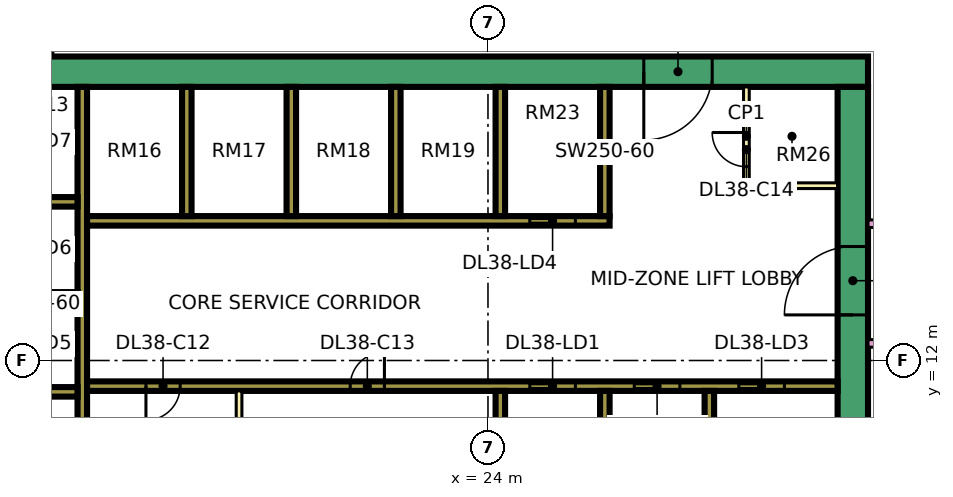
"""IFC4 building model, lengths in metres.
Left out: names, types, materials, properties, quantities, classifications, styles, units other than length and angle.
Written with IfcOpenShell. Run it as: python <this file> out.ifc"""

import sys

from ifc_helpers import new_model, si_unit, direction, frame, frame_2d, origin, place, context, subcontext, project, spatial, rectangle, extrude, element, fill, save


model = new_model("IFC4")
c1 = context("Model", 3, precision=1e-05, world=origin(), true_north=direction((0.0, 1.0)))
c2 = subcontext(c1, "Body", "Model", "MODEL_VIEW")
j1 = project(units=[si_unit("LENGTHUNIT", "METRE"), si_unit("PLANEANGLEUNIT", "RADIAN")], contexts=[c1])
p1 = place(None, origin())
s1 = spatial("IfcSite", under=j1, at=p1, CompositionType="ELEMENT")
p2 = place(p1, origin())
s2 = spatial("IfcBuilding", under=s1, at=p2, CompositionType="ELEMENT")
p3 = place(p2, frame((0.0, 0.0, 168.65)))
s3 = spatial("IfcBuildingStorey", under=s2, at=p3, CompositionType="ELEMENT", Elevation=168.65)
p4 = place(p3, frame((9.0, 19.6, 0.0), z_axis=(0.0, 0.0, 1.0), x_axis=(1.0, 0.0, 0.0)))
e1 = element("IfcWall", 1, at=p4, inside=s3, PredefinedType="SHEAR", context=c2, shape_type="SweptSolid", body=[
    extrude(rectangle(XDim=25.0, YDim=0.8, at=frame_2d((12.5, 0.0))), origin(), (0.0, 0.0, 1.0), 3.75),
])
p5 = place(p4, frame((19.1, 0.0, 0.0)))
e2 = element("IfcOpeningElement", 2, at=p5, cuts=e1, PredefinedType="OPENING", context=c2, shape_type="SweptSolid", body=[
    extrude(rectangle(XDim=1.8, YDim=2.4, at=frame_2d((0.9, 1.2))), frame((0.0, 0.41, 0.0), z_axis=(0.0, -1.0, 0.0), x_axis=(1.0, 0.0, 0.0)), (0.0, 0.0, 1.0), 0.82),
])
p6 = place(p3, frame((33.6, 7.8, 0.0), z_axis=(0.0, 0.0, 1.0), x_axis=(0.0, 1.0, 0.0)))
e3 = element("IfcWall", 3, at=p6, inside=s3, PredefinedType="SHEAR", context=c2, shape_type="SweptSolid", body=[
    extrude(rectangle(XDim=11.4, YDim=0.8, at=frame_2d((5.7, 0.0))), origin(), (0.0, 0.0, 1.0), 3.75),
])
p7 = place(p6, frame((5.4, 0.0, 0.0)))
e4 = element("IfcOpeningElement", 4, at=p7, cuts=e3, PredefinedType="OPENING", context=c2, shape_type="SweptSolid", body=[
    extrude(rectangle(XDim=1.8, YDim=2.4, at=frame_2d((0.9, 1.2))), frame((0.0, 0.41, 0.0), z_axis=(0.0, -1.0, 0.0), x_axis=(1.0, 0.0, 0.0)), (0.0, 0.0, 1.0), 0.82),
])
p8 = place(p3, frame((13.325, 7.8, 0.0), z_axis=(0.0, 0.0, 1.0), x_axis=(0.0, 1.0, 0.0)))
e5 = element("IfcWall", 5, at=p8, inside=s3, PredefinedType="SHEAR", context=c2, shape_type="SweptSolid", body=[
    extrude(rectangle(XDim=11.4, YDim=0.25, at=frame_2d((5.7, 0.0))), origin(), (0.0, 0.0, 1.0), 3.75),
])
p9 = place(p3, frame((13.45, 11.325, 0.0), z_axis=(0.0, 0.0, 1.0), x_axis=(1.0, 0.0, 0.0)))
e6 = element("IfcWall", 6, at=p9, inside=s3, PredefinedType="SHEAR", context=c2, shape_type="SweptSolid", body=[
    extrude(rectangle(XDim=19.75, YDim=0.25, at=frame_2d((9.875, 0.0))), origin(), (0.0, 0.0, 1.0), 3.75),
])
p10 = place(p9, frame((11.65, 0.0, 0.0)))
e7 = element("IfcOpeningElement", 7, at=p10, cuts=e6, PredefinedType="OPENING", context=c2, shape_type="SweptSolid", body=[
    extrude(rectangle(XDim=1.2, YDim=2.2, at=frame_2d((0.6, 1.1))), frame((0.0, 0.135, 0.0), z_axis=(0.0, -1.0, 0.0), x_axis=(1.0, 0.0, 0.0)), (0.0, 0.0, 1.0), 0.27),
])
p11 = place(p9, frame((14.4, 0.0, 0.0)))
e8 = element("IfcOpeningElement", 8, at=p11, cuts=e6, PredefinedType="OPENING", context=c2, shape_type="SweptSolid", body=[
    extrude(rectangle(XDim=1.2, YDim=2.2, at=frame_2d((0.6, 1.1))), frame((0.0, 0.135, 0.0), z_axis=(0.0, -1.0, 0.0), x_axis=(1.0, 0.0, 0.0)), (0.0, 0.0, 1.0), 0.27),
])
p12 = place(p9, frame((17.15, 0.0, 0.0)))
e9 = element("IfcOpeningElement", 9, at=p12, cuts=e6, PredefinedType="OPENING", context=c2, shape_type="SweptSolid", body=[
    extrude(rectangle(XDim=1.2, YDim=2.2, at=frame_2d((0.6, 1.1))), frame((0.0, 0.135, 0.0), z_axis=(0.0, -1.0, 0.0), x_axis=(1.0, 0.0, 0.0)), (0.0, 0.0, 1.0), 0.27),
])
p13 = place(p9, frame((1.55, 0.0, 0.0)))
e10 = element("IfcOpeningElement", 10, at=p13, cuts=e6, PredefinedType="OPENING", context=c2, shape_type="SweptSolid", body=[
    extrude(rectangle(XDim=0.9, YDim=2.1, at=frame_2d((0.45, 1.05))), frame((0.0, 0.135, 0.0), z_axis=(0.0, -1.0, 0.0), x_axis=(1.0, 0.0, 0.0)), (0.0, 0.0, 1.0), 0.27),
])
p14 = place(p9, frame((6.925, 0.0, 0.0)))
e11 = element("IfcOpeningElement", 11, at=p14, cuts=e6, PredefinedType="OPENING", context=c2, shape_type="SweptSolid", body=[
    extrude(rectangle(XDim=0.9, YDim=2.1, at=frame_2d((0.45, 1.05))), frame((0.0, 0.135, 0.0), z_axis=(0.0, -1.0, 0.0), x_axis=(1.0, 0.0, 0.0)), (0.0, 0.0, 1.0), 0.27),
])
p15 = place(p3, frame((13.45, 15.675, 0.0), z_axis=(0.0, 0.0, 1.0), x_axis=(1.0, 0.0, 0.0)))
e12 = element("IfcWall", 12, at=p15, inside=s3, PredefinedType="SHEAR", context=c2, shape_type="SweptSolid", body=[
    extrude(rectangle(XDim=13.75, YDim=0.25, at=frame_2d((6.875, 0.0))), origin(), (0.0, 0.0, 1.0), 3.75),
])
p16 = place(p15, frame((11.65, 0.0, 0.0)))
e13 = element("IfcOpeningElement", 13, at=p16, cuts=e12, PredefinedType="OPENING", context=c2, shape_type="SweptSolid", body=[
    extrude(rectangle(XDim=1.2, YDim=2.2, at=frame_2d((0.6, 1.1))), frame((0.0, 0.135, 0.0), z_axis=(0.0, -1.0, 0.0), x_axis=(1.0, 0.0, 0.0)), (0.0, 0.0, 1.0), 0.27),
])
for number, where, z_axis, x_axis in (
    (14, (10.2, 11.175, 0.0), (0.0, 0.0, 1.0), (1.0, 0.0, 0.0)),
    (15, (10.2, 13.675, 0.0), (0.0, 0.0, 1.0), (1.0, 0.0, 0.0)),
    (16, (10.2, 16.175, 0.0), (0.0, 0.0, 1.0), (1.0, 0.0, 0.0)),
):
    element("IfcWall", number, at=place(p3, frame(where, z_axis=z_axis, x_axis=x_axis)), inside=s3, PredefinedType="SHEAR", context=c2, shape_type="SweptSolid", body=[
        extrude(rectangle(XDim=3.0, YDim=0.25, at=frame_2d((1.5, 0.0))), origin(), (0.0, 0.0, 1.0), 3.75),
    ])
for number, where, z_axis, x_axis in (
    (17, (24.325, 7.8, 0.0), (0.0, 0.0, 1.0), (0.0, 1.0, 0.0)),
    (18, (27.075, 7.8, 0.0), (0.0, 0.0, 1.0), (0.0, 1.0, 0.0)),
    (19, (29.825, 7.8, 0.0), (0.0, 0.0, 1.0), (0.0, 1.0, 0.0)),
    (20, (16.075, 15.8, 0.0), (0.0, 0.0, 1.0), (0.0, 1.0, 0.0)),
    (21, (18.825, 15.8, 0.0), (0.0, 0.0, 1.0), (0.0, 1.0, 0.0)),
    (22, (21.575, 15.8, 0.0), (0.0, 0.0, 1.0), (0.0, 1.0, 0.0)),
    (23, (24.325, 15.8, 0.0), (0.0, 0.0, 1.0), (0.0, 1.0, 0.0)),
    (24, (27.075, 15.8, 0.0), (0.0, 0.0, 1.0), (0.0, 1.0, 0.0)),
):
    element("IfcWall", number, at=place(p3, frame(where, z_axis=z_axis, x_axis=x_axis)), inside=s3, PredefinedType="SHEAR", context=c2, shape_type="SweptSolid", body=[
        extrude(rectangle(XDim=3.4, YDim=0.25, at=frame_2d((1.7, 0.0))), origin(), (0.0, 0.0, 1.0), 3.75),
    ])
p17 = place(p3, frame((-1.447, 12.553, 0.0), z_axis=(0.0, 0.0, 1.0), x_axis=(0.707106781187, -0.707106781187, 0.0)))
e25 = element("IfcWall", 25, at=p17, inside=s3, PredefinedType="SOLIDWALL", context=c2, shape_type="SweptSolid", body=[
    extrude(rectangle(XDim=19.799, YDim=0.15, at=frame_2d((9.899, 0.0))), origin(), (0.0, 0.0, 1.0), 3.35),
])
p18 = place(p17, frame((2.212, 0.0, 0.45)))
e26 = element("IfcOpeningElement", 26, at=p18, cuts=e25, PredefinedType="OPENING", context=c2, shape_type="SweptSolid", body=[
    extrude(rectangle(XDim=3.0, YDim=2.4, at=frame_2d((1.5, 1.2))), frame((0.0, 0.085, 0.0), z_axis=(0.0, -1.0, 0.0), x_axis=(1.0, 0.0, 0.0)), (0.0, 0.0, 1.0), 0.17),
])
p19 = place(p17, frame((10.216, 0.0, 0.45)))
e27 = element("IfcOpeningElement", 27, at=p19, cuts=e25, PredefinedType="OPENING", context=c2, shape_type="SweptSolid", body=[
    extrude(rectangle(XDim=3.0, YDim=2.4, at=frame_2d((1.5, 1.2))), frame((0.0, 0.085, 0.0), z_axis=(0.0, -1.0, 0.0), x_axis=(1.0, 0.0, 0.0)), (0.0, 0.0, 1.0), 0.17),
])
p20 = place(p3, frame((17.45, 7.8, 0.0), z_axis=(0.0, 0.0, 1.0), x_axis=(0.0, 1.0, 0.0)))
e28 = element("IfcWall", 28, at=p20, inside=s3, PredefinedType="PARTITIONING", context=c2, shape_type="SweptSolid", body=[
    extrude(rectangle(XDim=3.4, YDim=0.15, at=frame_2d((1.7, 0.0))), origin(), (0.0, 0.0, 1.0), 3.35),
])
p21 = place(p3, frame((30.8, 16.6, 0.0), z_axis=(0.0, 0.0, 1.0), x_axis=(0.0, 1.0, 0.0)))
e29 = element("IfcWall", 29, at=p21, inside=s3, PredefinedType="PARTITIONING", context=c2, shape_type="SweptSolid", body=[
    extrude(rectangle(XDim=2.6, YDim=0.15, at=frame_2d((1.3, 0.0))), origin(), (0.0, 0.0, 1.0), 3.35),
])
p22 = place(p21, frame((0.5, 0.0, 0.0)))
e30 = element("IfcOpeningElement", 30, at=p22, cuts=e29, PredefinedType="OPENING", context=c2, shape_type="SweptSolid", body=[
    extrude(rectangle(XDim=0.9, YDim=2.1, at=frame_2d((0.45, 1.05))), frame((0.0, 0.085, 0.0), z_axis=(0.0, -1.0, 0.0), x_axis=(1.0, 0.0, 0.0)), (0.0, 0.0, 1.0), 0.17),
])
p23 = place(p3, frame((30.8, 16.6, 0.0), z_axis=(0.0, 0.0, 1.0), x_axis=(1.0, 0.0, 0.0)))
e31 = element("IfcWall", 31, at=p23, inside=s3, PredefinedType="PARTITIONING", context=c2, shape_type="SweptSolid", body=[
    extrude(rectangle(XDim=2.4, YDim=0.15, at=frame_2d((1.2, 0.0))), origin(), (0.0, 0.0, 1.0), 3.35),
])
p24 = place(p3, frame((12.45, 20.0, 0.0), z_axis=(0.0, 0.0, 1.0), x_axis=(0.0, 1.0, 0.0)))
e32 = element("IfcWall", 32, at=p24, inside=s3, PredefinedType="PARTITIONING", context=c2, shape_type="SweptSolid", body=[
    extrude(rectangle(XDim=42.926, YDim=0.2, at=frame_2d((21.463, 0.0))), origin(), (0.0, 0.0, 1.0), 3.35),
])
p25 = place(p24, frame((6.55, 0.0, 0.0)))
e33 = element("IfcOpeningElement", 33, at=p25, cuts=e32, PredefinedType="OPENING", context=c2, shape_type="SweptSolid", body=[
    extrude(rectangle(XDim=1.0, YDim=2.1, at=frame_2d((0.5, 1.05))), frame((0.0, 0.11, 0.0), z_axis=(0.0, -1.0, 0.0), x_axis=(1.0, 0.0, 0.0)), (0.0, 0.0, 1.0), 0.22),
])
p26 = place(p24, frame((12.25, 0.0, 0.0)))
e34 = element("IfcOpeningElement", 34, at=p26, cuts=e32, PredefinedType="OPENING", context=c2, shape_type="SweptSolid", body=[
    extrude(rectangle(XDim=1.6, YDim=2.1, at=frame_2d((0.8, 1.05))), frame((0.0, 0.11, 0.0), z_axis=(0.0, -1.0, 0.0), x_axis=(1.0, 0.0, 0.0)), (0.0, 0.0, 1.0), 0.22),
])
p27 = place(p24, frame((16.9, 0.0, 0.0)))
e35 = element("IfcOpeningElement", 35, at=p27, cuts=e32, PredefinedType="OPENING", context=c2, shape_type="SweptSolid", body=[
    extrude(rectangle(XDim=1.0, YDim=2.1, at=frame_2d((0.5, 1.05))), frame((0.0, 0.11, 0.0), z_axis=(0.0, -1.0, 0.0), x_axis=(1.0, 0.0, 0.0)), (0.0, 0.0, 1.0), 0.22),
])
p28 = place(p24, frame((40.9, 0.0, 0.0)))
e36 = element("IfcOpeningElement", 36, at=p28, cuts=e32, PredefinedType="OPENING", context=c2, shape_type="SweptSolid", body=[
    extrude(rectangle(XDim=1.0, YDim=2.1, at=frame_2d((0.5, 1.05))), frame((0.0, 0.11, 0.0), z_axis=(0.0, -1.0, 0.0), x_axis=(1.0, 0.0, 0.0)), (0.0, 0.0, 1.0), 0.22),
])
p29 = place(p24, frame((1.15, 0.0, 0.0)))
e37 = element("IfcOpeningElement", 37, at=p29, cuts=e32, PredefinedType="OPENING", context=c2, shape_type="SweptSolid", body=[
    extrude(rectangle(XDim=1.8, YDim=2.1, at=frame_2d((0.9, 1.05))), frame((0.0, 0.11, 0.0), z_axis=(0.0, -1.0, 0.0), x_axis=(1.0, 0.0, 0.0)), (0.0, 0.0, 1.0), 0.22),
])
p30 = place(p24, frame((28.6, 0.0, 0.0)))
e38 = element("IfcOpeningElement", 38, at=p30, cuts=e32, PredefinedType="OPENING", context=c2, shape_type="SweptSolid", body=[
    extrude(rectangle(XDim=1.8, YDim=2.1, at=frame_2d((0.9, 1.05))), frame((0.0, 0.11, 0.0), z_axis=(0.0, -1.0, 0.0), x_axis=(1.0, 0.0, 0.0)), (0.0, 0.0, 1.0), 0.22),
])
p31 = place(p3, frame((34.0, 12.45, 0.0), z_axis=(0.0, 0.0, 1.0), x_axis=(1.0, 0.0, 0.0)))
e39 = element("IfcWall", 39, at=p31, inside=s3, PredefinedType="PARTITIONING", context=c2, shape_type="SweptSolid", body=[
    extrude(rectangle(XDim=2.451, YDim=0.2, at=frame_2d((1.226, 0.0))), origin(), (0.0, 0.0, 1.0), 3.35),
])
p32 = place(p3, frame((34.0, 15.6, 0.0), z_axis=(0.0, 0.0, 1.0), x_axis=(1.0, 0.0, 0.0)))
e40 = element("IfcWall", 40, at=p32, inside=s3, PredefinedType="PARTITIONING", context=c2, shape_type="SweptSolid", body=[
    extrude(rectangle(XDim=10.35, YDim=0.2, at=frame_2d((5.175, 0.0))), origin(), (0.0, 0.0, 1.0), 3.35),
])
p33 = place(p32, frame((5.6, 0.0, 0.0)))
e41 = element("IfcOpeningElement", 41, at=p33, cuts=e40, PredefinedType="OPENING", context=c2, shape_type="SweptSolid", body=[
    extrude(rectangle(XDim=1.0, YDim=2.1, at=frame_2d((0.5, 1.05))), frame((0.0, 0.11, 0.0), z_axis=(0.0, -1.0, 0.0), x_axis=(1.0, 0.0, 0.0)), (0.0, 0.0, 1.0), 0.22),
])
p34 = place(p32, frame((0.45, 0.0, 0.0)))
e42 = element("IfcOpeningElement", 42, at=p34, cuts=e40, PredefinedType="OPENING", context=c2, shape_type="SweptSolid", body=[
    extrude(rectangle(XDim=1.2, YDim=2.1, at=frame_2d((0.6, 1.05))), frame((0.0, 0.11, 0.0), z_axis=(0.0, -1.0, 0.0), x_axis=(1.0, 0.0, 0.0)), (0.0, 0.0, 1.0), 0.22),
])
p35 = place(p10, origin())
e43 = element("IfcDoor", 43, at=p35, inside=s3, OperationType="DOUBLE_DOOR_SLIDING", PredefinedType="DOOR", context=c2, shape_type="SweptSolid", body=[
    extrude(rectangle(XDim=1.2, YDim=2.2, at=frame_2d((0.6, 1.1))), frame((0.0, 0.025, 0.0), z_axis=(0.0, -1.0, 0.0), x_axis=(1.0, 0.0, 0.0)), (0.0, 0.0, 1.0), 0.05),
])
fill(e7, e43)
p36 = place(p11, origin())
e44 = element("IfcDoor", 44, at=p36, inside=s3, OperationType="DOUBLE_DOOR_SLIDING", PredefinedType="DOOR", context=c2, shape_type="SweptSolid", body=[
    extrude(rectangle(XDim=1.2, YDim=2.2, at=frame_2d((0.6, 1.1))), frame((0.0, 0.025, 0.0), z_axis=(0.0, -1.0, 0.0), x_axis=(1.0, 0.0, 0.0)), (0.0, 0.0, 1.0), 0.05),
])
fill(e8, e44)
p37 = place(p12, origin())
e45 = element("IfcDoor", 45, at=p37, inside=s3, OperationType="DOUBLE_DOOR_SLIDING", PredefinedType="DOOR", context=c2, shape_type="SweptSolid", body=[
    extrude(rectangle(XDim=1.2, YDim=2.2, at=frame_2d((0.6, 1.1))), frame((0.0, 0.025, 0.0), z_axis=(0.0, -1.0, 0.0), x_axis=(1.0, 0.0, 0.0)), (0.0, 0.0, 1.0), 0.05),
])
fill(e9, e45)
p38 = place(p16, origin())
e46 = element("IfcDoor", 46, at=p38, inside=s3, OperationType="DOUBLE_DOOR_SLIDING", PredefinedType="DOOR", context=c2, shape_type="SweptSolid", body=[
    extrude(rectangle(XDim=1.2, YDim=2.2, at=frame_2d((0.6, 1.1))), frame((0.0, 0.025, 0.0), z_axis=(0.0, -1.0, 0.0), x_axis=(1.0, 0.0, 0.0)), (0.0, 0.0, 1.0), 0.05),
])
fill(e13, e46)
p39 = place(p7, origin())
e47 = element("IfcDoor", 47, at=p39, inside=s3, OperationType="DOUBLE_DOOR_SINGLE_SWING", PredefinedType="DOOR", context=c2, shape_type="SweptSolid", body=[
    extrude(rectangle(XDim=1.8, YDim=2.4, at=frame_2d((0.9, 1.2))), frame((0.0, 0.025, 0.0), z_axis=(0.0, -1.0, 0.0), x_axis=(1.0, 0.0, 0.0)), (0.0, 0.0, 1.0), 0.05),
])
fill(e4, e47)
p40 = place(p5, frame((1.8, 0.0, 0.0), z_axis=(0.0, 0.0, 1.0), x_axis=(-1.0, 0.0, 0.0)))
e48 = element("IfcDoor", 48, at=p40, inside=s3, OperationType="DOUBLE_DOOR_SINGLE_SWING", PredefinedType="DOOR", context=c2, shape_type="SweptSolid", body=[
    extrude(rectangle(XDim=1.8, YDim=2.4, at=frame_2d((0.9, 1.2))), frame((0.0, 0.025, 0.0), z_axis=(0.0, -1.0, 0.0), x_axis=(1.0, 0.0, 0.0)), (0.0, 0.0, 1.0), 0.05),
])
fill(e2, e48)
p41 = place(p13, frame((0.9, 0.0, 0.0), z_axis=(0.0, 0.0, 1.0), x_axis=(-1.0, 0.0, 0.0)))
e49 = element("IfcDoor", 49, at=p41, inside=s3, OperationType="SINGLE_SWING_LEFT", PredefinedType="DOOR", context=c2, shape_type="SweptSolid", body=[
    extrude(rectangle(XDim=0.9, YDim=2.1, at=frame_2d((0.45, 1.05))), frame((0.0, 0.025, 0.0), z_axis=(0.0, -1.0, 0.0), x_axis=(1.0, 0.0, 0.0)), (0.0, 0.0, 1.0), 0.05),
])
fill(e10, e49)
p42 = place(p14, frame((0.9, 0.0, 0.0), z_axis=(0.0, 0.0, 1.0), x_axis=(-1.0, 0.0, 0.0)))
e50 = element("IfcDoor", 50, at=p42, inside=s3, OperationType="SINGLE_SWING_RIGHT", PredefinedType="DOOR", context=c2, shape_type="SweptSolid", body=[
    extrude(rectangle(XDim=0.9, YDim=2.1, at=frame_2d((0.45, 1.05))), frame((0.0, 0.025, 0.0), z_axis=(0.0, -1.0, 0.0), x_axis=(1.0, 0.0, 0.0)), (0.0, 0.0, 1.0), 0.05),
])
fill(e11, e50)
p43 = place(p22, frame((0.9, 0.0, 0.0), z_axis=(0.0, 0.0, 1.0), x_axis=(-1.0, 0.0, 0.0)))
e51 = element("IfcDoor", 51, at=p43, inside=s3, OperationType="SINGLE_SWING_RIGHT", PredefinedType="DOOR", context=c2, shape_type="SweptSolid", body=[
    extrude(rectangle(XDim=0.9, YDim=2.1, at=frame_2d((0.45, 1.05))), frame((0.0, 0.025, 0.0), z_axis=(0.0, -1.0, 0.0), x_axis=(1.0, 0.0, 0.0)), (0.0, 0.0, 1.0), 0.05),
])
fill(e30, e51)
save(model, sys.argv[1])
